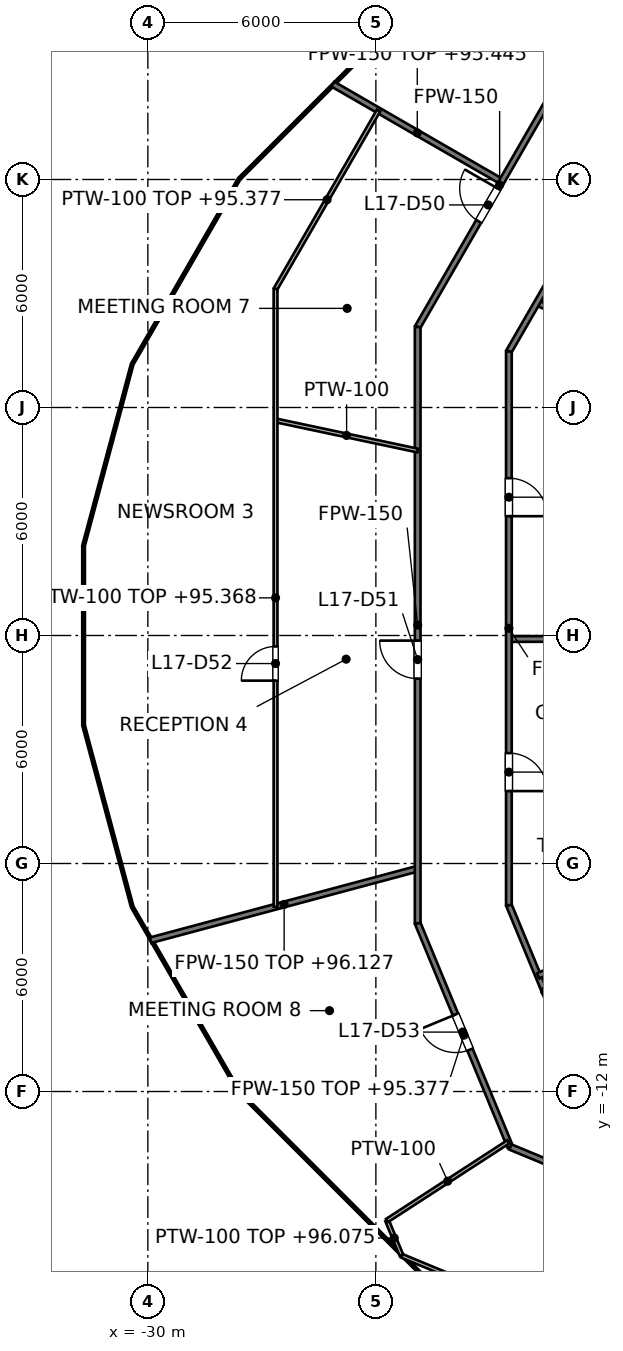
"""IFC4 building model, lengths in metres.
Left out: names, types, materials, properties, quantities, classifications, styles, units other than length and angle.
Written with IfcOpenShell. Run it as: python <this file> out.ifc"""

import sys

from ifc_helpers import new_model, si_unit, direction, frame, frame_2d, origin, place, context, subcontext, project, spatial, rectangle, extrude, element, fill, save


model = new_model("IFC4")
c1 = context("Model", 3, precision=1e-05, world=origin(), true_north=direction((0.0, 1.0)))
c2 = subcontext(c1, "Body", "Model", "MODEL_VIEW")
j1 = project(units=[si_unit("LENGTHUNIT", "METRE"), si_unit("PLANEANGLEUNIT", "RADIAN")], contexts=[c1])
p1 = place(None, origin())
s1 = spatial("IfcSite", under=j1, at=p1, CompositionType="ELEMENT")
p2 = place(p1, origin())
s2 = spatial("IfcBuilding", under=s1, at=p2, CompositionType="ELEMENT")
p3 = place(p2, frame((0.0, 0.0, 92.4)))
s3 = spatial("IfcBuildingStorey", under=s2, at=p3, CompositionType="ELEMENT", Elevation=92.4)
p4 = place(p3, frame((-22.9, -7.572, 0.0), z_axis=(0.0, 0.0, 1.0), x_axis=(0.382367581622, -0.924010298928, 0.0)))
e1 = element("IfcWall", 1, at=p4, inside=s3, PredefinedType="PARTITIONING", context=c2, shape_type="SweptSolid", body=[
    extrude(rectangle(XDim=6.374, YDim=0.15, at=frame_2d((3.187, 0.0))), origin(), (0.0, 0.0, 1.0), 2.977),
])
p5 = place(p4, frame((2.6, 0.0, 0.0)))
e2 = element("IfcOpeningElement", 2, at=p5, cuts=e1, PredefinedType="OPENING", context=c2, shape_type="SweptSolid", body=[
    extrude(rectangle(XDim=1.0, YDim=2.1, at=frame_2d((0.5, 1.05))), frame((0.0, 0.075, 0.0), z_axis=(0.0, -1.0, 0.0), x_axis=(1.0, 0.0, 0.0)), (0.0, 0.0, 1.0), 0.15),
])
p6 = place(p3, frame((-20.5, -7.095, 0.0), z_axis=(0.0, 0.0, 1.0), x_axis=(0.382364990163, -0.924011371303, 0.0)))
e3 = element("IfcWall", 3, at=p6, inside=s3, PredefinedType="PARTITIONING", context=c2, shape_type="SweptSolid", body=[
    extrude(rectangle(XDim=4.902, YDim=0.15, at=frame_2d((2.451, 0.0))), origin(), (0.0, 0.0, 1.0), 2.977),
])
p7 = place(p3, frame((-25.131, 14.509, 0.0), z_axis=(0.0, 0.0, 1.0), x_axis=(0.866037334331, -0.499979335118, 0.0)))
e4 = element("IfcWall", 4, at=p7, inside=s3, PredefinedType="PARTITIONING", context=c2, shape_type="SweptSolid", body=[
    extrude(rectangle(XDim=5.128, YDim=0.15, at=frame_2d((2.564, 0.0))), origin(), (0.0, 0.0, 1.0), 3.045),
])
p8 = place(p3, frame((-19.76, 8.755, 0.0), z_axis=(0.0, 0.0, 1.0), x_axis=(0.91424834547, -0.405154245695, 0.0)))
e5 = element("IfcWall", 5, at=p8, inside=s3, PredefinedType="PARTITIONING", context=c2, shape_type="SweptSolid", body=[
    extrude(rectangle(XDim=5.318, YDim=0.15, at=frame_2d((2.659, 0.0))), origin(), (0.0, 0.0, 1.0), 2.977),
])
p9 = place(p3, frame((-20.46, -13.46, 0.0), z_axis=(0.0, 0.0, 1.0), x_axis=(0.923801547606, -0.382871650349, 0.0)))
e6 = element("IfcWall", 6, at=p9, inside=s3, PredefinedType="PARTITIONING", context=c2, shape_type="SweptSolid", body=[
    extrude(rectangle(XDim=6.415, YDim=0.15, at=frame_2d((3.208, 0.0))), origin(), (0.0, 0.0, 1.0), 2.968),
])
p10 = place(p9, frame((2.707, 0.0, 0.0)))
e7 = element("IfcOpeningElement", 7, at=p10, cuts=e6, PredefinedType="OPENING", context=c2, shape_type="SweptSolid", body=[
    extrude(rectangle(XDim=1.0, YDim=2.1, at=frame_2d((0.5, 1.05))), frame((0.0, 0.075, 0.0), z_axis=(0.0, -1.0, 0.0), x_axis=(1.0, 0.0, 0.0)), (0.0, 0.0, 1.0), 0.15),
])
p11 = place(p3, frame((-20.5, -0.094, 0.0), z_axis=(0.0, 0.0, 1.0), x_axis=(0.999990148138, 0.004438876723, 0.0)))
e8 = element("IfcWall", 8, at=p11, inside=s3, PredefinedType="PARTITIONING", context=c2, shape_type="SweptSolid", body=[
    extrude(rectangle(XDim=5.5, YDim=0.15, at=frame_2d((2.75, 0.0))), origin(), (0.0, 0.0, 1.0), 2.968),
])
p12 = place(p3, frame((-29.928, -8.019, 0.0), z_axis=(0.0, 0.0, 1.0), x_axis=(0.965929629594, 0.258804850559, 0.0)))
e9 = element("IfcWall", 9, at=p12, inside=s3, PredefinedType="PARTITIONING", context=c2, shape_type="SweptSolid", body=[
    extrude(rectangle(XDim=7.276, YDim=0.15, at=frame_2d((3.638, 0.0))), origin(), (0.0, 0.0, 1.0), 3.727),
])
p13 = place(p3, frame((-19.728, -8.958, 0.0), z_axis=(0.0, 0.0, 1.0), x_axis=(0.910629511797, 0.413223779863, 0.0)))
e10 = element("IfcWall", 10, at=p13, inside=s3, PredefinedType="PARTITIONING", context=c2, shape_type="SweptSolid", body=[
    extrude(rectangle(XDim=5.368, YDim=0.15, at=frame_2d((2.684, 0.0))), origin(), (0.0, 0.0, 1.0), 3.9),
])
p14 = place(p3, frame((-20.5, 7.474, 0.0), z_axis=(0.0, 0.0, 1.0), x_axis=(0.500012665616, 0.866018091164, 0.0)))
e11 = element("IfcWall", 11, at=p14, inside=s3, PredefinedType="PARTITIONING", context=c2, shape_type="SweptSolid", body=[
    extrude(rectangle(XDim=6.602, YDim=0.15, at=frame_2d((3.301, 0.0))), origin(), (0.0, 0.0, 1.0), 2.968),
])
p15 = place(p14, frame((2.803, 0.0, 0.0)))
e12 = element("IfcOpeningElement", 12, at=p15, cuts=e11, PredefinedType="OPENING", context=c2, shape_type="SweptSolid", body=[
    extrude(rectangle(XDim=1.0, YDim=2.1, at=frame_2d((0.5, 1.05))), frame((0.0, 0.075, 0.0), z_axis=(0.0, -1.0, 0.0), x_axis=(1.0, 0.0, 0.0)), (0.0, 0.0, 1.0), 0.15),
])
p16 = place(p3, frame((-22.9, 8.117, 0.0), z_axis=(0.0, 0.0, 1.0), x_axis=(0.5000050195, 0.866022505755, 0.0)))
e13 = element("IfcWall", 13, at=p16, inside=s3, PredefinedType="PARTITIONING", context=c2, shape_type="SweptSolid", body=[
    extrude(rectangle(XDim=8.626, YDim=0.15, at=frame_2d((4.313, 0.0))), origin(), (0.0, 0.0, 1.0), 2.968),
])
p17 = place(p16, frame((3.211, 0.0, 0.0)))
e14 = element("IfcOpeningElement", 14, at=p17, cuts=e13, PredefinedType="OPENING", context=c2, shape_type="SweptSolid", body=[
    extrude(rectangle(XDim=1.0, YDim=2.1, at=frame_2d((0.5, 1.05))), frame((0.0, 0.075, 0.0), z_axis=(0.0, -1.0, 0.0), x_axis=(1.0, 0.0, 0.0)), (0.0, 0.0, 1.0), 0.15),
])
p18 = place(p3, frame((-20.5, -7.095, 0.0), z_axis=(0.0, 0.0, 1.0), x_axis=(0.0, 1.0, 0.0)))
e15 = element("IfcWall", 15, at=p18, inside=s3, PredefinedType="PARTITIONING", context=c2, shape_type="SweptSolid", body=[
    extrude(rectangle(XDim=14.569, YDim=0.15, at=frame_2d((7.285, 0.0))), origin(), (0.0, 0.0, 1.0), 2.968),
])
p19 = place(p18, frame((10.234, 0.0, 0.0)))
e16 = element("IfcOpeningElement", 16, at=p19, cuts=e15, PredefinedType="OPENING", context=c2, shape_type="SweptSolid", body=[
    extrude(rectangle(XDim=1.0, YDim=2.1, at=frame_2d((0.5, 1.05))), frame((0.0, 0.075, 0.0), z_axis=(0.0, -1.0, 0.0), x_axis=(1.0, 0.0, 0.0)), (0.0, 0.0, 1.0), 0.15),
])
p20 = place(p18, frame((3.0, 0.0, 0.0)))
e17 = element("IfcOpeningElement", 17, at=p20, cuts=e15, PredefinedType="OPENING", context=c2, shape_type="SweptSolid", body=[
    extrude(rectangle(XDim=1.0, YDim=2.1, at=frame_2d((0.5, 1.05))), frame((0.0, 0.075, 0.0), z_axis=(0.0, -1.0, 0.0), x_axis=(1.0, 0.0, 0.0)), (0.0, 0.0, 1.0), 0.15),
])
p21 = place(p3, frame((-22.9, -7.572, 0.0), z_axis=(0.0, 0.0, 1.0), x_axis=(0.0, 1.0, 0.0)))
e18 = element("IfcWall", 18, at=p21, inside=s3, PredefinedType="PARTITIONING", context=c2, shape_type="SweptSolid", body=[
    extrude(rectangle(XDim=15.689, YDim=0.15, at=frame_2d((7.844, 0.0))), origin(), (0.0, 0.0, 1.0), 2.968),
])
p22 = place(p21, frame((6.438, 0.0, 0.0)))
e19 = element("IfcOpeningElement", 19, at=p22, cuts=e18, PredefinedType="OPENING", context=c2, shape_type="SweptSolid", body=[
    extrude(rectangle(XDim=1.0, YDim=2.1, at=frame_2d((0.5, 1.05))), frame((0.0, 0.075, 0.0), z_axis=(0.0, -1.0, 0.0), x_axis=(1.0, 0.0, 0.0)), (0.0, 0.0, 1.0), 0.15),
])
p23 = place(p3, frame((-23.706, -15.395, 0.0), z_axis=(0.0, 0.0, 1.0), x_axis=(0.382734348683, -0.923858440638, 0.0)))
e20 = element("IfcWall", 20, at=p23, inside=s3, PredefinedType="PARTITIONING", context=c2, shape_type="SweptSolid", body=[
    extrude(rectangle(XDim=0.996, YDim=0.1, at=frame_2d((0.498, 0.0))), origin(), (0.0, 0.0, 1.0), 3.675),
])
p24 = place(p3, frame((-23.315, -16.325, 0.0), z_axis=(0.0, 0.0, 1.0), x_axis=(0.923811686722, -0.382847185541, 0.0)))
e21 = element("IfcWall", 21, at=p24, inside=s3, PredefinedType="PARTITIONING", context=c2, shape_type="SweptSolid", body=[
    extrude(rectangle(XDim=8.719, YDim=0.1, at=frame_2d((4.36, 0.0))), origin(), (0.0, 0.0, 1.0), 2.968),
])
p25 = place(p3, frame((-26.64, 5.662, 0.0), z_axis=(0.0, 0.0, 1.0), x_axis=(0.978136613381, -0.207963375533, 0.0)))
e22 = element("IfcWall", 22, at=p25, inside=s3, PredefinedType="PARTITIONING", context=c2, shape_type="SweptSolid", body=[
    extrude(rectangle(XDim=3.823, YDim=0.1, at=frame_2d((1.912, 0.0))), origin(), (0.0, 0.0, 1.0), 3.9),
])
p26 = place(p3, frame((-23.706, -15.395, 0.0), z_axis=(0.0, 0.0, 1.0), x_axis=(0.838733884708, 0.544541523341, 0.0)))
e23 = element("IfcWall", 23, at=p26, inside=s3, PredefinedType="PARTITIONING", context=c2, shape_type="SweptSolid", body=[
    extrude(rectangle(XDim=3.803, YDim=0.1, at=frame_2d((1.902, 0.0))), origin(), (0.0, 0.0, 1.0), 3.9),
])
p27 = place(p3, frame((-26.64, 9.119, 0.0), z_axis=(0.0, 0.0, 1.0), x_axis=(0.499955005135, 0.866051380023, 0.0)))
e24 = element("IfcWall", 24, at=p27, inside=s3, PredefinedType="PARTITIONING", context=c2, shape_type="SweptSolid", body=[
    extrude(rectangle(XDim=5.422, YDim=0.1, at=frame_2d((2.711, 0.0))), origin(), (0.0, 0.0, 1.0), 2.977),
])
p28 = place(p3, frame((-26.64, -7.138, 0.0), z_axis=(0.0, 0.0, 1.0), x_axis=(0.0, 1.0, 0.0)))
e25 = element("IfcWall", 25, at=p28, inside=s3, PredefinedType="PARTITIONING", context=c2, shape_type="SweptSolid", body=[
    extrude(rectangle(XDim=16.257, YDim=0.1, at=frame_2d((8.128, 0.0))), origin(), (0.0, 0.0, 1.0), 2.968),
])
p29 = place(p28, frame((5.95, 0.0, 0.0)))
e26 = element("IfcOpeningElement", 26, at=p29, cuts=e25, PredefinedType="OPENING", context=c2, shape_type="SweptSolid", body=[
    extrude(rectangle(XDim=0.9, YDim=2.1, at=frame_2d((0.45, 1.05))), frame((0.0, 0.05, 0.0), z_axis=(0.0, -1.0, 0.0), x_axis=(1.0, 0.0, 0.0)), (0.0, 0.0, 1.0), 0.1),
])
p30 = place(p19, origin())
e27 = element("IfcDoor", 27, at=p30, inside=s3, OperationType="SINGLE_SWING_LEFT", PredefinedType="DOOR", context=c2, shape_type="SweptSolid", body=[
    extrude(rectangle(XDim=1.0, YDim=2.1, at=frame_2d((0.5, 1.05))), frame((0.0, 0.025, 0.0), z_axis=(0.0, -1.0, 0.0), x_axis=(1.0, 0.0, 0.0)), (0.0, 0.0, 1.0), 0.05),
])
fill(e16, e27)
p31 = place(p20, origin())
e28 = element("IfcDoor", 28, at=p31, inside=s3, OperationType="SINGLE_SWING_LEFT", PredefinedType="DOOR", context=c2, shape_type="SweptSolid", body=[
    extrude(rectangle(XDim=1.0, YDim=2.1, at=frame_2d((0.5, 1.05))), frame((0.0, 0.025, 0.0), z_axis=(0.0, -1.0, 0.0), x_axis=(1.0, 0.0, 0.0)), (0.0, 0.0, 1.0), 0.05),
])
fill(e17, e28)
p32 = place(p17, origin())
e29 = element("IfcDoor", 29, at=p32, inside=s3, OperationType="SINGLE_SWING_RIGHT", PredefinedType="DOOR", context=c2, shape_type="SweptSolid", body=[
    extrude(rectangle(XDim=1.0, YDim=2.1, at=frame_2d((0.5, 1.05))), frame((0.0, 0.025, 0.0), z_axis=(0.0, -1.0, 0.0), x_axis=(1.0, 0.0, 0.0)), (0.0, 0.0, 1.0), 0.05),
])
fill(e14, e29)
p33 = place(p22, origin())
e30 = element("IfcDoor", 30, at=p33, inside=s3, OperationType="SINGLE_SWING_RIGHT", PredefinedType="DOOR", context=c2, shape_type="SweptSolid", body=[
    extrude(rectangle(XDim=1.0, YDim=2.1, at=frame_2d((0.5, 1.05))), frame((0.0, 0.025, 0.0), z_axis=(0.0, -1.0, 0.0), x_axis=(1.0, 0.0, 0.0)), (0.0, 0.0, 1.0), 0.05),
])
fill(e19, e30)
p34 = place(p29, origin())
e31 = element("IfcDoor", 31, at=p34, inside=s3, OperationType="SINGLE_SWING_LEFT", PredefinedType="DOOR", context=c2, shape_type="SweptSolid", body=[
    extrude(rectangle(XDim=0.9, YDim=2.1, at=frame_2d((0.45, 1.05))), frame((0.0, 0.025, 0.0), z_axis=(0.0, -1.0, 0.0), x_axis=(1.0, 0.0, 0.0)), (0.0, 0.0, 1.0), 0.05),
])
fill(e26, e31)
p35 = place(p5, origin())
e32 = element("IfcDoor", 32, at=p35, inside=s3, OperationType="SINGLE_SWING_LEFT", PredefinedType="DOOR", context=c2, shape_type="SweptSolid", body=[
    extrude(rectangle(XDim=1.0, YDim=2.1, at=frame_2d((0.5, 1.05))), frame((0.0, 0.025, 0.0), z_axis=(0.0, -1.0, 0.0), x_axis=(1.0, 0.0, 0.0)), (0.0, 0.0, 1.0), 0.05),
])
fill(e2, e32)
save(model, sys.argv[1])
